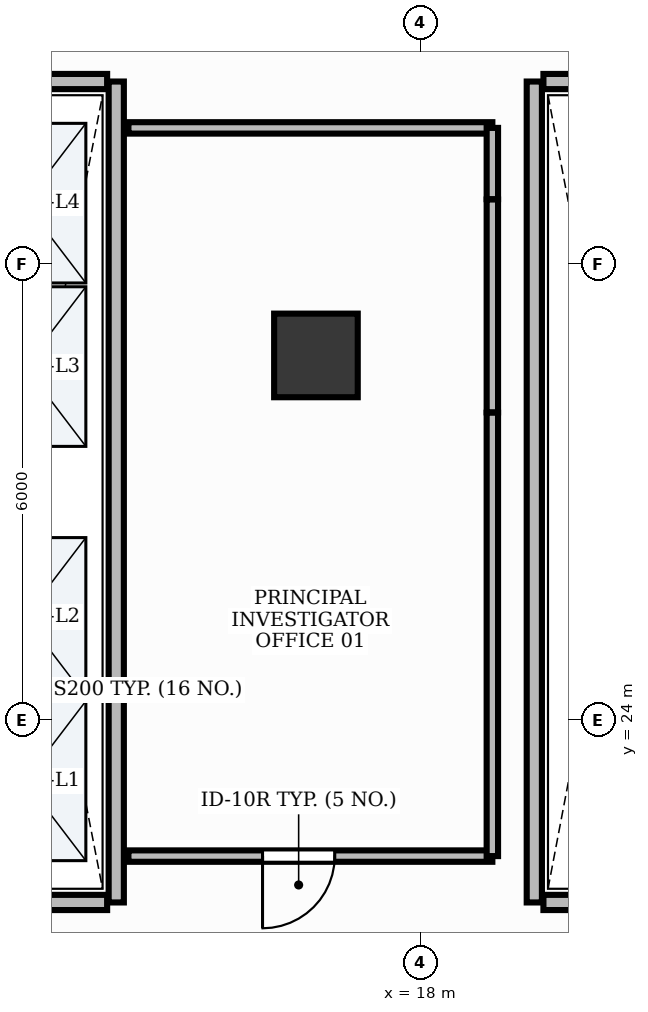
"""IFC4 building model, lengths in metres.
Left out: names, types, materials, properties, quantities, classifications, styles, units other than length and angle.
Written with IfcOpenShell. Run it as: python <this file> out.ifc"""

import sys

from ifc_helpers import new_model, si_unit, direction, frame, frame_2d, origin, origin_2d, place, context, subcontext, project, spatial, rectangle, extrude, element, fill, save


model = new_model("IFC4")
c1 = context("Model", 3, precision=1e-05, world=origin(), true_north=direction((0.0, 1.0)))
c2 = subcontext(c1, "Body", "Model", "MODEL_VIEW")
j1 = project(units=[si_unit("LENGTHUNIT", "METRE"), si_unit("PLANEANGLEUNIT", "RADIAN")], contexts=[c1])
p1 = place(None, origin())
s1 = spatial("IfcSite", under=j1, at=p1, CompositionType="ELEMENT")
p2 = place(p1, origin())
s2 = spatial("IfcBuilding", under=s1, at=p2, CompositionType="ELEMENT")
p3 = place(p2, frame((0.0, 0.0, 140.4)))
s3 = spatial("IfcBuildingStorey", under=s2, at=p3, CompositionType="ELEMENT", Elevation=140.4)
p4 = place(p3, frame((16.627, 28.797, -0.0), z_axis=(0.0, 0.0, 1.0), x_axis=(1.0, 0.0, 0.0)))
e1 = element("IfcColumn", 1, at=p4, inside=s3, PredefinedType="COLUMN", context=c2, shape_type="SweptSolid", body=[
    extrude(rectangle(XDim=1.1, YDim=1.1, at=origin_2d()), origin(), (0.0, 0.0, 1.0), 3.901),
])
p5 = place(p3, frame((14.0, 21.6, 0.0), z_axis=(0.0, 0.0, 1.0), x_axis=(0.0, 1.0, 0.0)))
e2 = element("IfcWall", 2, at=p5, inside=s3, PredefinedType="PARTITIONING", context=c2, shape_type="SweptSolid", body=[
    extrude(rectangle(XDim=10.8, YDim=0.2, at=frame_2d((5.4, 0.0))), origin(), (0.0, 0.0, 1.0), 2.91),
])
for number, where, z_axis, x_axis in (
    (3, (11.72, 21.6, 0.0), (0.0, 0.0, 1.0), (1.0, 0.0, 0.0)),
    (4, (11.72, 32.4, 0.0), (0.0, 0.0, 1.0), (1.0, 0.0, 0.0)),
):
    element("IfcWall", number, at=place(p3, frame(where, z_axis=z_axis, x_axis=x_axis)), inside=s3, PredefinedType="PARTITIONING", context=c2, shape_type="SweptSolid", body=[
        extrude(rectangle(XDim=2.16, YDim=0.2, at=frame_2d((1.08, 0.0))), origin(), (0.0, 0.0, 1.0), 2.91),
    ])
p6 = place(p3, frame((19.5, 21.6, 0.0), z_axis=(0.0, 0.0, 1.0), x_axis=(0.0, 1.0, 0.0)))
e5 = element("IfcWall", 5, at=p6, inside=s3, PredefinedType="PARTITIONING", context=c2, shape_type="SweptSolid", body=[
    extrude(rectangle(XDim=10.8, YDim=0.2, at=frame_2d((5.4, 0.0))), origin(), (0.0, 0.0, 1.0), 2.91),
])
for number, where, z_axis, x_axis in (
    (6, (19.62, 21.6, 0.0), (0.0, 0.0, 1.0), (1.0, 0.0, 0.0)),
    (7, (19.62, 32.4, 0.0), (0.0, 0.0, 1.0), (1.0, 0.0, 0.0)),
):
    element("IfcWall", number, at=place(p3, frame(where, z_axis=z_axis, x_axis=x_axis)), inside=s3, PredefinedType="PARTITIONING", context=c2, shape_type="SweptSolid", body=[
        extrude(rectangle(XDim=2.11, YDim=0.2, at=frame_2d((1.055, 0.0))), origin(), (0.0, 0.0, 1.0), 2.91),
    ])
p7 = place(p3, frame((18.948, 22.21, 0.0), z_axis=(0.0, 0.0, 1.0), x_axis=(-1.0, 0.0, 0.0)))
e8 = element("IfcWall", 8, at=p7, inside=s3, PredefinedType="PARTITIONING", context=c2, shape_type="SweptSolid", body=[
    extrude(rectangle(XDim=4.788, YDim=0.15, at=frame_2d((2.394, 0.0))), origin(), (0.0, 0.0, 1.0), 2.91),
])
p8 = place(p7, frame((2.073, 0.0, 0.0)))
e9 = element("IfcOpeningElement", 9, at=p8, cuts=e8, PredefinedType="OPENING", context=c2, shape_type="SweptSolid", body=[
    extrude(rectangle(XDim=0.95, YDim=2.15, at=frame_2d((0.475, 1.075))), frame((0.0, 0.09, 0.0), z_axis=(0.0, -1.0, 0.0), x_axis=(1.0, 0.0, 0.0)), (0.0, 0.0, 1.0), 0.18),
])
p9 = place(p3, frame((14.16, 31.79, 0.0), z_axis=(0.0, 0.0, 1.0), x_axis=(1.0, 0.0, 0.0)))
e10 = element("IfcWall", 10, at=p9, inside=s3, PredefinedType="PARTITIONING", context=c2, shape_type="SweptSolid", body=[
    extrude(rectangle(XDim=4.788, YDim=0.15, at=frame_2d((2.394, 0.0))), origin(), (0.0, 0.0, 1.0), 2.91),
])
p10 = place(p3, frame((18.948, 31.79, 0.0), z_axis=(0.0, 0.0, 1.0), x_axis=(0.0, -1.0, 0.0)))
e11 = element("IfcWall", 11, at=p10, inside=s3, PredefinedType="PARTITIONING", context=c2, shape_type="SweptSolid", body=[
    extrude(rectangle(XDim=0.938, YDim=0.15, at=frame_2d((0.469, 0.0))), origin(), (0.0, 0.0, 1.0), 2.91),
])
p11 = place(p3, frame((18.948, 30.848, 0.0), z_axis=(0.0, 0.0, 1.0), x_axis=(0.0, -1.0, 0.0)))
e12 = element("IfcWall", 12, at=p11, inside=s3, PredefinedType="PARTITIONING", context=c2, shape_type="SweptSolid", body=[
    extrude(rectangle(XDim=2.801, YDim=0.15, at=frame_2d((1.4, 0.0))), origin(), (0.0, 0.0, 1.0), 2.91),
])
p12 = place(p3, frame((18.948, 28.043, 0.0), z_axis=(0.0, 0.0, 1.0), x_axis=(0.0, -1.0, 0.0)))
e13 = element("IfcWall", 13, at=p12, inside=s3, PredefinedType="PARTITIONING", context=c2, shape_type="SweptSolid", body=[
    extrude(rectangle(XDim=5.833, YDim=0.15, at=frame_2d((2.917, 0.0))), origin(), (0.0, 0.0, 1.0), 2.91),
])
p13 = place(p8, origin())
e14 = element("IfcDoor", 14, at=p13, inside=s3, OperationType="SINGLE_SWING_RIGHT", PredefinedType="DOOR", context=c2, shape_type="SweptSolid", body=[
    extrude(rectangle(XDim=0.95, YDim=2.15, at=frame_2d((0.475, 1.075))), frame((0.0, 0.025, 0.0), z_axis=(0.0, -1.0, 0.0), x_axis=(1.0, 0.0, 0.0)), (0.0, 0.0, 1.0), 0.05),
])
fill(e9, e14)
save(model, sys.argv[1])
